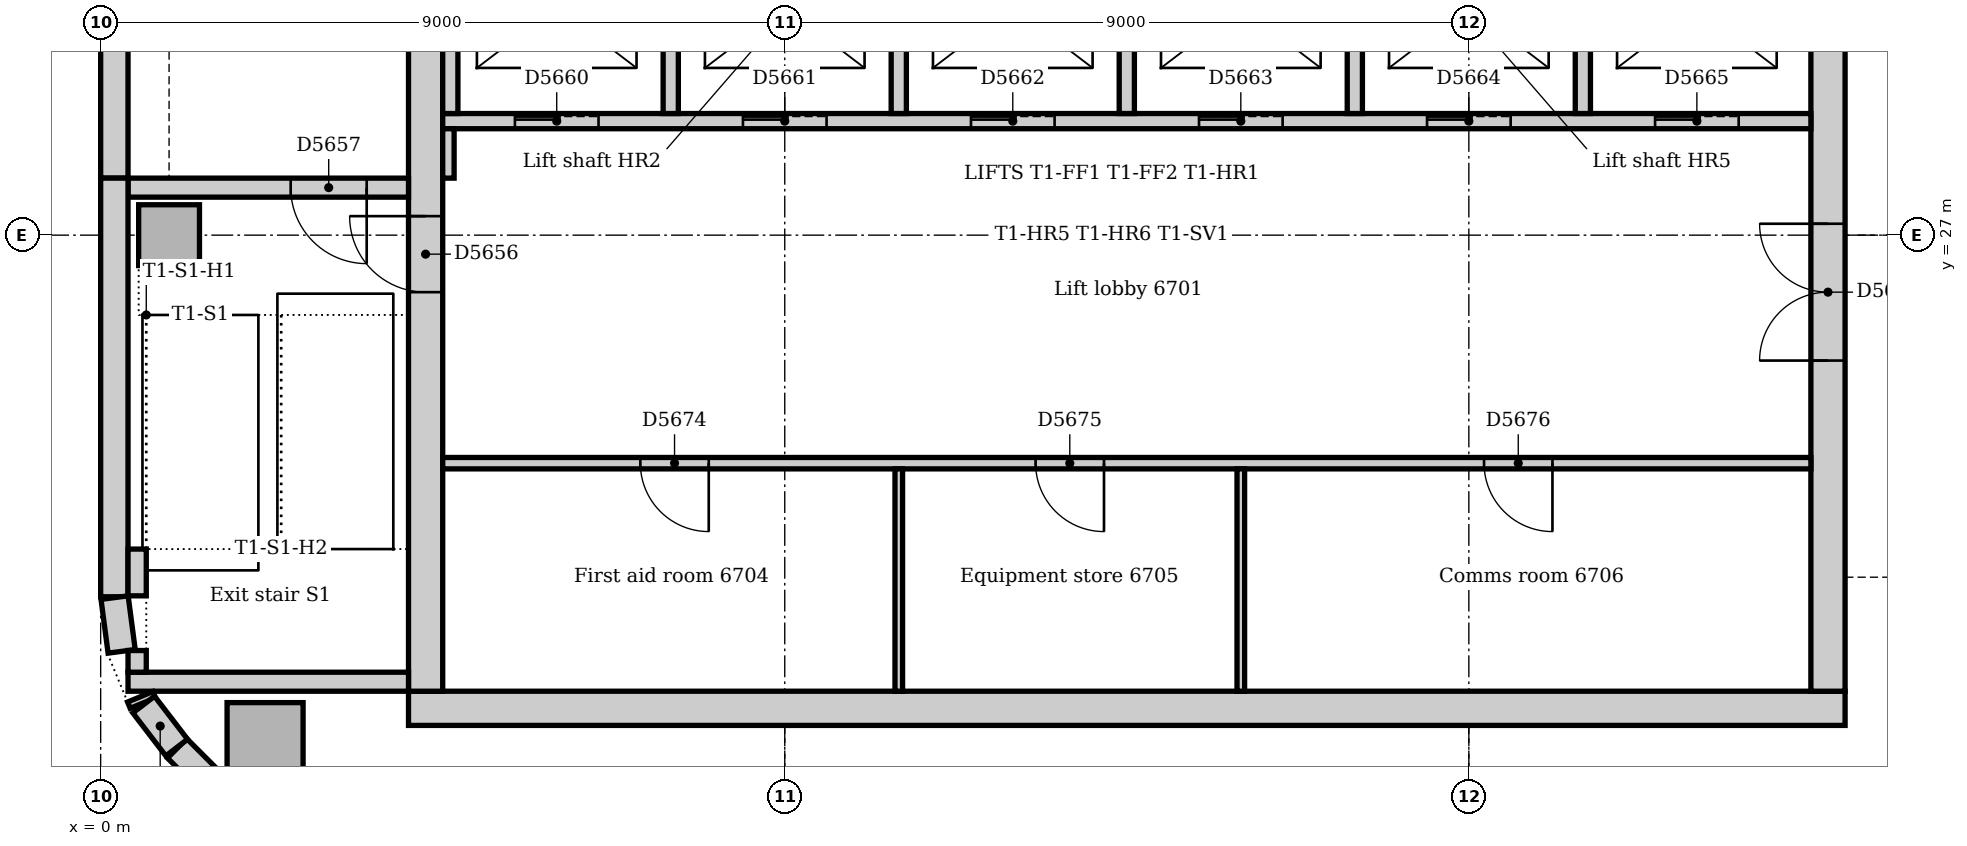
"""IFC4 building model, lengths in metres.
Left out: names, types, materials, properties, quantities, classifications, styles, units other than length and angle.
Written with IfcOpenShell. Run it as: python <this file> out.ifc"""

import sys

from ifc_helpers import new_model, si_unit, direction, frame, frame_2d, origin, origin_2d, place, context, subcontext, project, spatial, rectangle, extrude, element, fill, save


model = new_model("IFC4")
c1 = context("Model", 3, precision=1e-05, world=origin(), true_north=direction((0.0, 1.0)))
c2 = subcontext(c1, "Body", "Model", "MODEL_VIEW")
j1 = project(units=[si_unit("LENGTHUNIT", "METRE"), si_unit("PLANEANGLEUNIT", "RADIAN")], contexts=[c1])
p1 = place(None, origin())
s1 = spatial("IfcSite", under=j1, at=p1, CompositionType="ELEMENT")
p2 = place(p1, origin())
s2 = spatial("IfcBuilding", under=s1, at=p2, CompositionType="ELEMENT")
p3 = place(p2, frame((0.0, 0.0, 279.0)))
s3 = spatial("IfcBuildingStorey", under=s2, at=p3, CompositionType="ELEMENT", Elevation=279.0)
p4 = place(p3, frame((4.05, 20.775, 0.0), z_axis=(0.0, 0.0, 1.0), x_axis=(1.0, 0.0, 0.0)))
e1 = element("IfcWall", 1, at=p4, inside=s3, PredefinedType="SOLIDWALL", context=c2, shape_type="SweptSolid", body=[
    extrude(rectangle(XDim=18.9, YDim=0.45, at=frame_2d((9.45, 0.0))), origin(), (0.0, 0.0, 1.0), 4.0),
])
p5 = place(p3, frame((22.725, 21.0, 0.0), z_axis=(0.0, 0.0, 1.0), x_axis=(0.0, 1.0, 0.0)))
e2 = element("IfcWall", 2, at=p5, inside=s3, PredefinedType="SOLIDWALL", context=c2, shape_type="SweptSolid", body=[
    extrude(rectangle(XDim=10.5, YDim=0.45, at=frame_2d((5.25, 0.0))), origin(), (0.0, 0.0, 1.0), 4.0),
])
p6 = place(p5, frame((4.35, 0.0, 0.0)))
e3 = element("IfcOpeningElement", 3, at=p6, cuts=e2, PredefinedType="OPENING", context=c2, shape_type="SweptSolid", body=[
    extrude(rectangle(XDim=1.8, YDim=2.1, at=frame_2d((0.9, 1.05))), frame((0.0, 0.235, 0.0), z_axis=(0.0, -1.0, 0.0), x_axis=(1.0, 0.0, 0.0)), (0.0, 0.0, 1.0), 0.47),
])
p7 = place(p3, frame((4.275, 31.5, 0.0), z_axis=(0.0, 0.0, 1.0), x_axis=(0.0, -1.0, 0.0)))
e4 = element("IfcWall", 4, at=p7, inside=s3, PredefinedType="SOLIDWALL", context=c2, shape_type="SweptSolid", body=[
    extrude(rectangle(XDim=10.5, YDim=0.45, at=frame_2d((5.25, 0.0))), origin(), (0.0, 0.0, 1.0), 4.0),
])
p8 = place(p7, frame((4.25, 0.0, 0.0)))
e5 = element("IfcOpeningElement", 5, at=p8, cuts=e4, PredefinedType="OPENING", context=c2, shape_type="SweptSolid", body=[
    extrude(rectangle(XDim=1.0, YDim=2.1, at=frame_2d((0.5, 1.05))), frame((0.0, 0.235, 0.0), z_axis=(0.0, -1.0, 0.0), x_axis=(1.0, 0.0, 0.0)), (0.0, 0.0, 1.0), 0.47),
])
p9 = place(p3, frame((0.36, 21.125, 0.0), z_axis=(0.0, 0.0, 1.0), x_axis=(1.0, 0.0, 0.0)))
e6 = element("IfcWall", 6, at=p9, inside=s3, PredefinedType="SOLIDWALL", context=c2, shape_type="SweptSolid", body=[
    extrude(rectangle(XDim=3.69, YDim=0.25, at=frame_2d((1.845, 0.0))), origin(), (0.0, 0.0, 1.0), 4.0),
])
p10 = place(p3, frame((4.05, 27.625, 0.0), z_axis=(0.0, 0.0, 1.0), x_axis=(-1.0, 0.0, 0.0)))
e7 = element("IfcWall", 7, at=p10, inside=s3, PredefinedType="SOLIDWALL", context=c2, shape_type="SweptSolid", body=[
    extrude(rectangle(XDim=3.69, YDim=0.25, at=frame_2d((1.845, 0.0))), origin(), (0.0, 0.0, 1.0), 4.0),
])
p11 = place(p10, frame((0.55, 0.0, 0.0)))
e8 = element("IfcOpeningElement", 8, at=p11, cuts=e7, PredefinedType="OPENING", context=c2, shape_type="SweptSolid", body=[
    extrude(rectangle(XDim=1.0, YDim=2.1, at=frame_2d((0.5, 1.05))), frame((0.0, 0.135, 0.0), z_axis=(0.0, -1.0, 0.0), x_axis=(1.0, 0.0, 0.0)), (0.0, 0.0, 1.0), 0.27),
])
p12 = place(p3, frame((2.163, 20.35, 0.0), z_axis=(0.0, 0.0, 1.0), x_axis=(1.0, 0.0, 0.0)))
e9 = element("IfcColumn", 9, at=p12, inside=s3, PredefinedType="COLUMN", context=c2, shape_type="SweptSolid", body=[
    extrude(rectangle(XDim=1.0, YDim=1.0, at=origin_2d()), origin(), (0.0, 0.0, 1.0), 3.8),
])
p13 = place(p3, frame((0.9, 27.0, 0.0), z_axis=(0.0, 0.0, 1.0), x_axis=(1.0, 0.0, 0.0)))
e10 = element("IfcColumn", 10, at=p13, inside=s3, PredefinedType="COLUMN", context=c2, shape_type="SweptSolid", body=[
    extrude(rectangle(XDim=0.8, YDim=0.8, at=origin_2d()), origin(), (0.0, 0.0, 1.0), 4.0),
])
p14 = place(p3, frame((0.18, 35.25, 0.0), z_axis=(0.0, 0.0, 1.0), x_axis=(0.0, -1.0, 0.0)))
e11 = element("IfcWall", 11, at=p14, inside=s3, PredefinedType="STANDARD", context=c2, shape_type="SweptSolid", body=[
    extrude(rectangle(XDim=7.5, YDim=0.36, at=frame_2d((3.75, 0.0))), origin(), (0.0, 0.0, 1.0), 3.8),
])
p15 = place(p3, frame((0.18, 27.75, 0.0), z_axis=(0.0, 0.0, 1.0), x_axis=(0.0, -1.0, 0.0)))
e12 = element("IfcWall", 12, at=p15, inside=s3, PredefinedType="STANDARD", context=c2, shape_type="SweptSolid", body=[
    extrude(rectangle(XDim=5.507, YDim=0.36, at=frame_2d((2.754, 0.0))), origin(), (0.0, 0.0, 1.0), 3.8),
])
p16 = place(p3, frame((1.006, 20.249, 0.0), z_axis=(0.0, 0.0, 1.0), x_axis=(0.707106781187, -0.707106781187, 0.0)))
e13 = element("IfcWall", 13, at=p16, inside=s3, PredefinedType="STANDARD", context=c2, shape_type="SweptSolid", body=[
    extrude(rectangle(XDim=1.757, YDim=0.36, at=frame_2d((0.879, 0.0))), origin(), (0.0, 0.0, 1.0), 3.8),
])
p17 = place(p3, frame((0.183, 22.231, 0.0), z_axis=(0.0, 0.0, 1.0), x_axis=(0.13055608231, -0.99144092581, 0.0)))
e14 = element("IfcWall", 14, at=p17, inside=s3, PredefinedType="STANDARD", context=c2, shape_type="SweptSolid", body=[
    extrude(rectangle(XDim=0.713, YDim=0.36, at=frame_2d((0.356, 0.0))), origin(), (0.0, 0.0, 1.0), 3.8),
])
p18 = place(p3, frame((0.521, 20.927, 0.0), z_axis=(0.0, 0.0, 1.0), x_axis=(0.382549378284, -0.923935048136, 0.0)))
e15 = element("IfcWall", 15, at=p18, inside=s3, PredefinedType="STANDARD", context=c2, shape_type="SweptSolid", body=[
    extrude(rectangle(XDim=0.089, YDim=0.36, at=frame_2d((0.045, 0.0))), origin(), (0.0, 0.0, 1.0), 3.8),
])
p19 = place(p3, frame((0.566, 20.825, 0.0), z_axis=(0.0, 0.0, 1.0), x_axis=(0.608802368033, -0.793321924995, 0.0)))
e16 = element("IfcWall", 16, at=p19, inside=s3, PredefinedType="STANDARD", context=c2, shape_type="SweptSolid", body=[
    extrude(rectangle(XDim=0.713, YDim=0.36, at=frame_2d((0.357, 0.0))), origin(), (0.0, 0.0, 1.0), 3.8),
])
p20 = place(p3, frame((0.48, 21.25, 0.0), z_axis=(0.0, 0.0, 1.0), x_axis=(0.0, 1.0, 0.0)))
e17 = element("IfcWall", 17, at=p20, inside=s3, PredefinedType="STANDARD", context=c2, shape_type="SweptSolid", body=[
    extrude(rectangle(XDim=0.285, YDim=0.24, at=frame_2d((0.143, 0.0))), origin(), (0.0, 0.0, 1.0), 4.0),
])
p21 = place(p3, frame((0.48, 22.255, 0.0), z_axis=(0.0, 0.0, 1.0), x_axis=(0.0, 1.0, 0.0)))
e18 = element("IfcWall", 18, at=p21, inside=s3, PredefinedType="STANDARD", context=c2, shape_type="SweptSolid", body=[
    extrude(rectangle(XDim=0.615, YDim=0.24, at=frame_2d((0.307, 0.0))), origin(), (0.0, 0.0, 1.0), 4.0),
])
p22 = place(p3, frame((4.5, 28.5, 0.0), z_axis=(0.0, 0.0, 1.0), x_axis=(1.0, 0.0, 0.0)))
e19 = element("IfcWall", 19, at=p22, inside=s3, PredefinedType="PARTITIONING", context=c2, shape_type="SweptSolid", body=[
    extrude(rectangle(XDim=18.0, YDim=0.2, at=frame_2d((9.0, 0.0))), origin(), (0.0, 0.0, 1.0), 3.8),
])
p23 = place(p22, frame((0.95, 0.0, 0.0)))
e20 = element("IfcOpeningElement", 20, at=p23, cuts=e19, PredefinedType="OPENING", context=c2, shape_type="SweptSolid", body=[
    extrude(rectangle(XDim=1.1, YDim=2.1, at=frame_2d((0.55, 1.05))), frame((0.0, 0.11, 0.0), z_axis=(0.0, -1.0, 0.0), x_axis=(1.0, 0.0, 0.0)), (0.0, 0.0, 1.0), 0.22),
])
p24 = place(p22, frame((3.95, 0.0, 0.0)))
e21 = element("IfcOpeningElement", 21, at=p24, cuts=e19, PredefinedType="OPENING", context=c2, shape_type="SweptSolid", body=[
    extrude(rectangle(XDim=1.1, YDim=2.1, at=frame_2d((0.55, 1.05))), frame((0.0, 0.11, 0.0), z_axis=(0.0, -1.0, 0.0), x_axis=(1.0, 0.0, 0.0)), (0.0, 0.0, 1.0), 0.22),
])
p25 = place(p22, frame((6.95, 0.0, 0.0)))
e22 = element("IfcOpeningElement", 22, at=p25, cuts=e19, PredefinedType="OPENING", context=c2, shape_type="SweptSolid", body=[
    extrude(rectangle(XDim=1.1, YDim=2.1, at=frame_2d((0.55, 1.05))), frame((0.0, 0.11, 0.0), z_axis=(0.0, -1.0, 0.0), x_axis=(1.0, 0.0, 0.0)), (0.0, 0.0, 1.0), 0.22),
])
p26 = place(p22, frame((9.95, 0.0, 0.0)))
e23 = element("IfcOpeningElement", 23, at=p26, cuts=e19, PredefinedType="OPENING", context=c2, shape_type="SweptSolid", body=[
    extrude(rectangle(XDim=1.1, YDim=2.1, at=frame_2d((0.55, 1.05))), frame((0.0, 0.11, 0.0), z_axis=(0.0, -1.0, 0.0), x_axis=(1.0, 0.0, 0.0)), (0.0, 0.0, 1.0), 0.22),
])
p27 = place(p22, frame((12.95, 0.0, 0.0)))
e24 = element("IfcOpeningElement", 24, at=p27, cuts=e19, PredefinedType="OPENING", context=c2, shape_type="SweptSolid", body=[
    extrude(rectangle(XDim=1.1, YDim=2.1, at=frame_2d((0.55, 1.05))), frame((0.0, 0.11, 0.0), z_axis=(0.0, -1.0, 0.0), x_axis=(1.0, 0.0, 0.0)), (0.0, 0.0, 1.0), 0.22),
])
p28 = place(p22, frame((15.95, 0.0, 0.0)))
e25 = element("IfcOpeningElement", 25, at=p28, cuts=e19, PredefinedType="OPENING", context=c2, shape_type="SweptSolid", body=[
    extrude(rectangle(XDim=1.1, YDim=2.1, at=frame_2d((0.55, 1.05))), frame((0.0, 0.11, 0.0), z_axis=(0.0, -1.0, 0.0), x_axis=(1.0, 0.0, 0.0)), (0.0, 0.0, 1.0), 0.22),
])
for number, where, z_axis, x_axis in (
    (26, (10.5, 28.6, 0.0), (0.0, 0.0, 1.0), (0.0, 1.0, 0.0)),
    (27, (13.5, 28.6, 0.0), (0.0, 0.0, 1.0), (0.0, 1.0, 0.0)),
    (28, (16.5, 28.6, 0.0), (0.0, 0.0, 1.0), (0.0, 1.0, 0.0)),
    (29, (19.5, 28.6, 0.0), (0.0, 0.0, 1.0), (0.0, 1.0, 0.0)),
    (30, (4.6, 28.6, 0.0), (0.0, 0.0, 1.0), (0.0, 1.0, 0.0)),
    (31, (7.5, 28.6, 0.0), (0.0, 0.0, 1.0), (0.0, 1.0, 0.0)),
):
    element("IfcWall", number, at=place(p3, frame(where, z_axis=z_axis, x_axis=x_axis)), inside=s3, PredefinedType="PARTITIONING", context=c2, shape_type="SweptSolid", body=[
        extrude(rectangle(XDim=2.65, YDim=0.2, at=frame_2d((1.325, 0.0))), origin(), (0.0, 0.0, 1.0), 3.8),
    ])
p29 = place(p3, frame((4.5, 24.0, 0.0), z_axis=(0.0, 0.0, 1.0), x_axis=(1.0, 0.0, 0.0)))
e32 = element("IfcWall", 32, at=p29, inside=s3, PredefinedType="PARTITIONING", context=c2, shape_type="SweptSolid", body=[
    extrude(rectangle(XDim=18.0, YDim=0.15, at=frame_2d((9.0, 0.0))), origin(), (0.0, 0.0, 1.0), 3.8),
])
p30 = place(p29, frame((2.6, 0.0, 0.0)))
e33 = element("IfcOpeningElement", 33, at=p30, cuts=e32, PredefinedType="OPENING", context=c2, shape_type="SweptSolid", body=[
    extrude(rectangle(XDim=0.9, YDim=2.1, at=frame_2d((0.45, 1.05))), frame((0.0, 0.085, 0.0), z_axis=(0.0, -1.0, 0.0), x_axis=(1.0, 0.0, 0.0)), (0.0, 0.0, 1.0), 0.17),
])
p31 = place(p29, frame((7.8, 0.0, 0.0)))
e34 = element("IfcOpeningElement", 34, at=p31, cuts=e32, PredefinedType="OPENING", context=c2, shape_type="SweptSolid", body=[
    extrude(rectangle(XDim=0.9, YDim=2.1, at=frame_2d((0.45, 1.05))), frame((0.0, 0.085, 0.0), z_axis=(0.0, -1.0, 0.0), x_axis=(1.0, 0.0, 0.0)), (0.0, 0.0, 1.0), 0.17),
])
p32 = place(p29, frame((13.7, 0.0, 0.0)))
e35 = element("IfcOpeningElement", 35, at=p32, cuts=e32, PredefinedType="OPENING", context=c2, shape_type="SweptSolid", body=[
    extrude(rectangle(XDim=0.9, YDim=2.1, at=frame_2d((0.45, 1.05))), frame((0.0, 0.085, 0.0), z_axis=(0.0, -1.0, 0.0), x_axis=(1.0, 0.0, 0.0)), (0.0, 0.0, 1.0), 0.17),
])
p33 = place(p3, frame((4.575, 27.75, 0.0), z_axis=(0.0, 0.0, 1.0), x_axis=(0.0, 1.0, 0.0)))
e36 = element("IfcWall", 36, at=p33, inside=s3, PredefinedType="PARTITIONING", context=c2, shape_type="SweptSolid", body=[
    extrude(rectangle(XDim=0.65, YDim=0.15, at=frame_2d((0.325, 0.0))), origin(), (0.0, 0.0, 1.0), 3.8),
])
for number, where, z_axis, x_axis in (
    (37, (10.5, 21.0, 0.0), (0.0, 0.0, 1.0), (0.0, 1.0, 0.0)),
    (38, (15.0, 21.0, 0.0), (0.0, 0.0, 1.0), (0.0, 1.0, 0.0)),
):
    element("IfcWall", number, at=place(p3, frame(where, z_axis=z_axis, x_axis=x_axis)), inside=s3, PredefinedType="PARTITIONING", context=c2, shape_type="SweptSolid", body=[
        extrude(rectangle(XDim=2.925, YDim=0.1, at=frame_2d((1.462, 0.0))), origin(), (0.0, 0.0, 1.0), 3.8),
    ])
p34 = place(p8, frame((1.0, 0.0, 0.0), z_axis=(0.0, 0.0, 1.0), x_axis=(-1.0, 0.0, 0.0)))
e39 = element("IfcDoor", 39, at=p34, inside=s3, OperationType="SINGLE_SWING_RIGHT", PredefinedType="DOOR", context=c2, shape_type="SweptSolid", body=[
    extrude(rectangle(XDim=1.0, YDim=2.1, at=frame_2d((0.5, 1.05))), frame((0.0, 0.025, 0.0), z_axis=(0.0, -1.0, 0.0), x_axis=(1.0, 0.0, 0.0)), (0.0, 0.0, 1.0), 0.05),
])
fill(e5, e39)
p35 = place(p11, origin())
e40 = element("IfcDoor", 40, at=p35, inside=s3, OperationType="SINGLE_SWING_LEFT", PredefinedType="DOOR", context=c2, shape_type="SweptSolid", body=[
    extrude(rectangle(XDim=1.0, YDim=2.1, at=frame_2d((0.5, 1.05))), frame((0.0, 0.025, 0.0), z_axis=(0.0, -1.0, 0.0), x_axis=(1.0, 0.0, 0.0)), (0.0, 0.0, 1.0), 0.05),
])
fill(e8, e40)
p36 = place(p23, origin())
e41 = element("IfcDoor", 41, at=p36, inside=s3, OperationType="SLIDING_TO_LEFT", PredefinedType="DOOR", context=c2, shape_type="SweptSolid", body=[
    extrude(rectangle(XDim=1.1, YDim=2.1, at=frame_2d((0.55, 1.05))), frame((0.0, 0.025, 0.0), z_axis=(0.0, -1.0, 0.0), x_axis=(1.0, 0.0, 0.0)), (0.0, 0.0, 1.0), 0.05),
])
fill(e20, e41)
p37 = place(p24, origin())
e42 = element("IfcDoor", 42, at=p37, inside=s3, OperationType="SLIDING_TO_LEFT", PredefinedType="DOOR", context=c2, shape_type="SweptSolid", body=[
    extrude(rectangle(XDim=1.1, YDim=2.1, at=frame_2d((0.55, 1.05))), frame((0.0, 0.025, 0.0), z_axis=(0.0, -1.0, 0.0), x_axis=(1.0, 0.0, 0.0)), (0.0, 0.0, 1.0), 0.05),
])
fill(e21, e42)
p38 = place(p25, origin())
e43 = element("IfcDoor", 43, at=p38, inside=s3, OperationType="SLIDING_TO_LEFT", PredefinedType="DOOR", context=c2, shape_type="SweptSolid", body=[
    extrude(rectangle(XDim=1.1, YDim=2.1, at=frame_2d((0.55, 1.05))), frame((0.0, 0.025, 0.0), z_axis=(0.0, -1.0, 0.0), x_axis=(1.0, 0.0, 0.0)), (0.0, 0.0, 1.0), 0.05),
])
fill(e22, e43)
p39 = place(p26, origin())
e44 = element("IfcDoor", 44, at=p39, inside=s3, OperationType="SLIDING_TO_LEFT", PredefinedType="DOOR", context=c2, shape_type="SweptSolid", body=[
    extrude(rectangle(XDim=1.1, YDim=2.1, at=frame_2d((0.55, 1.05))), frame((0.0, 0.025, 0.0), z_axis=(0.0, -1.0, 0.0), x_axis=(1.0, 0.0, 0.0)), (0.0, 0.0, 1.0), 0.05),
])
fill(e23, e44)
p40 = place(p27, origin())
e45 = element("IfcDoor", 45, at=p40, inside=s3, OperationType="SLIDING_TO_LEFT", PredefinedType="DOOR", context=c2, shape_type="SweptSolid", body=[
    extrude(rectangle(XDim=1.1, YDim=2.1, at=frame_2d((0.55, 1.05))), frame((0.0, 0.025, 0.0), z_axis=(0.0, -1.0, 0.0), x_axis=(1.0, 0.0, 0.0)), (0.0, 0.0, 1.0), 0.05),
])
fill(e24, e45)
p41 = place(p28, origin())
e46 = element("IfcDoor", 46, at=p41, inside=s3, OperationType="SLIDING_TO_LEFT", PredefinedType="DOOR", context=c2, shape_type="SweptSolid", body=[
    extrude(rectangle(XDim=1.1, YDim=2.1, at=frame_2d((0.55, 1.05))), frame((0.0, 0.025, 0.0), z_axis=(0.0, -1.0, 0.0), x_axis=(1.0, 0.0, 0.0)), (0.0, 0.0, 1.0), 0.05),
])
fill(e25, e46)
p42 = place(p6, origin())
e47 = element("IfcDoor", 47, at=p42, inside=s3, OperationType="DOUBLE_DOOR_DOUBLE_SWING", PredefinedType="DOOR", context=c2, shape_type="SweptSolid", body=[
    extrude(rectangle(XDim=1.8, YDim=2.1, at=frame_2d((0.9, 1.05))), frame((0.0, 0.025, 0.0), z_axis=(0.0, -1.0, 0.0), x_axis=(1.0, 0.0, 0.0)), (0.0, 0.0, 1.0), 0.05),
])
fill(e3, e47)
p43 = place(p30, frame((0.9, 0.0, 0.0), z_axis=(0.0, 0.0, 1.0), x_axis=(-1.0, 0.0, 0.0)))
e48 = element("IfcDoor", 48, at=p43, inside=s3, OperationType="SINGLE_SWING_LEFT", PredefinedType="DOOR", context=c2, shape_type="SweptSolid", body=[
    extrude(rectangle(XDim=0.9, YDim=2.1, at=frame_2d((0.45, 1.05))), frame((0.0, 0.025, 0.0), z_axis=(0.0, -1.0, 0.0), x_axis=(1.0, 0.0, 0.0)), (0.0, 0.0, 1.0), 0.05),
])
fill(e33, e48)
p44 = place(p31, frame((0.9, 0.0, 0.0), z_axis=(0.0, 0.0, 1.0), x_axis=(-1.0, 0.0, 0.0)))
e49 = element("IfcDoor", 49, at=p44, inside=s3, OperationType="SINGLE_SWING_LEFT", PredefinedType="DOOR", context=c2, shape_type="SweptSolid", body=[
    extrude(rectangle(XDim=0.9, YDim=2.1, at=frame_2d((0.45, 1.05))), frame((0.0, 0.025, 0.0), z_axis=(0.0, -1.0, 0.0), x_axis=(1.0, 0.0, 0.0)), (0.0, 0.0, 1.0), 0.05),
])
fill(e34, e49)
p45 = place(p32, frame((0.9, 0.0, 0.0), z_axis=(0.0, 0.0, 1.0), x_axis=(-1.0, 0.0, 0.0)))
e50 = element("IfcDoor", 50, at=p45, inside=s3, OperationType="SINGLE_SWING_LEFT", PredefinedType="DOOR", context=c2, shape_type="SweptSolid", body=[
    extrude(rectangle(XDim=0.9, YDim=2.1, at=frame_2d((0.45, 1.05))), frame((0.0, 0.025, 0.0), z_axis=(0.0, -1.0, 0.0), x_axis=(1.0, 0.0, 0.0)), (0.0, 0.0, 1.0), 0.05),
])
fill(e35, e50)
save(model, sys.argv[1])
